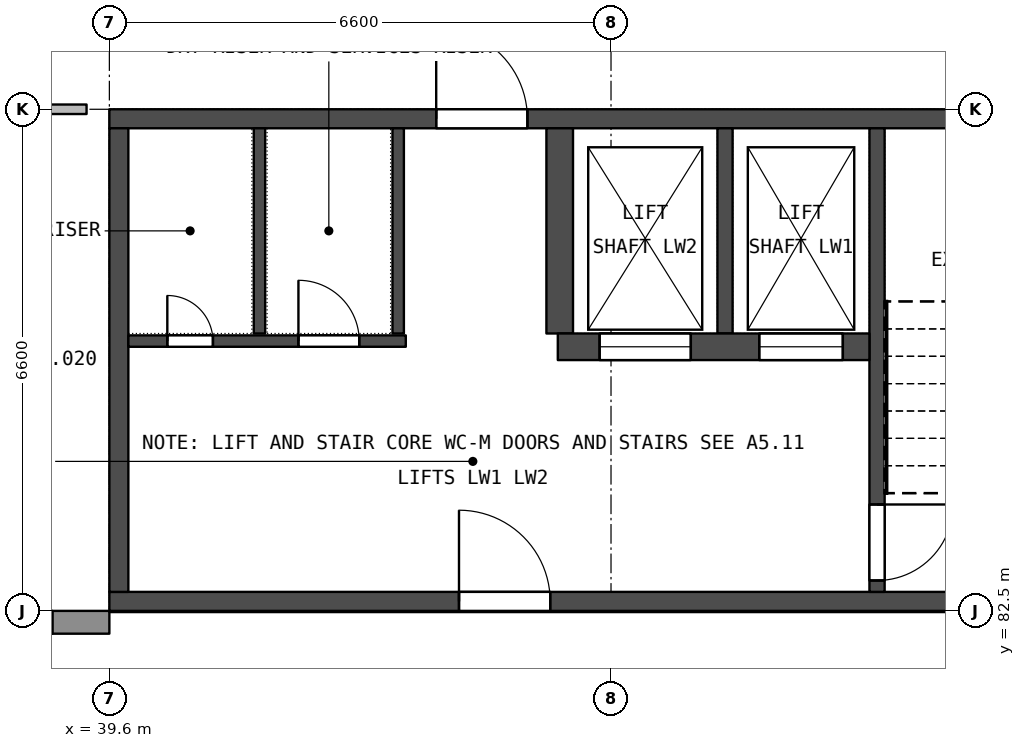
"""IFC4 building model, lengths in metres.
Left out: names, types, materials, properties, quantities, classifications, styles, units other than length and angle.
Written with IfcOpenShell. Run it as: python <this file> out.ifc"""

import sys

from ifc_helpers import new_model, si_unit, direction, frame, frame_2d, origin, place, context, subcontext, project, spatial, rectangle, extrude, element, fill, save


model = new_model("IFC4")
c1 = context("Model", 3, precision=1e-05, world=origin(), true_north=direction((0.0, 1.0)))
c2 = subcontext(c1, "Body", "Model", "MODEL_VIEW")
j1 = project(units=[si_unit("LENGTHUNIT", "METRE"), si_unit("PLANEANGLEUNIT", "RADIAN")], contexts=[c1])
p1 = place(None, origin())
s1 = spatial("IfcSite", under=j1, at=p1, CompositionType="ELEMENT")
p2 = place(p1, origin())
s2 = spatial("IfcBuilding", under=s1, at=p2, CompositionType="ELEMENT")
p3 = place(p2, origin())
s3 = spatial("IfcBuildingStorey", under=s2, at=p3, CompositionType="ELEMENT", Elevation=0.0)
p4 = place(p3, frame((52.8, 88.975, 0.0), z_axis=(0.0, 0.0, 1.0), x_axis=(-1.0, 0.0, 0.0)))
e1 = element("IfcWall", 1, at=p4, inside=s3, PredefinedType="SHEAR", context=c2, shape_type="SweptSolid", body=[
    extrude(rectangle(XDim=13.2, YDim=0.25, at=frame_2d((6.6, 0.0))), origin(), (0.0, 0.0, 1.0), 5.15),
])
p5 = place(p4, frame((7.7, 0.0, 0.0)))
e2 = element("IfcOpeningElement", 2, at=p5, cuts=e1, PredefinedType="OPENING", context=c2, shape_type="SweptSolid", body=[
    extrude(rectangle(XDim=1.2, YDim=2.1, at=frame_2d((0.6, 1.05))), frame((0.0, 0.135, 0.0), z_axis=(0.0, -1.0, 0.0), x_axis=(1.0, 0.0, 0.0)), (0.0, 0.0, 1.0), 0.27),
])
p6 = place(p3, frame((52.8, 82.625, 0.0), z_axis=(0.0, 0.0, 1.0), x_axis=(-1.0, 0.0, 0.0)))
e3 = element("IfcWall", 3, at=p6, inside=s3, PredefinedType="SHEAR", context=c2, shape_type="SweptSolid", body=[
    extrude(rectangle(XDim=13.2, YDim=0.25, at=frame_2d((6.6, 0.0))), origin(), (0.0, 0.0, 1.0), 5.15),
])
p7 = place(p6, frame((7.4, 0.0, 0.0)))
e4 = element("IfcOpeningElement", 4, at=p7, cuts=e3, PredefinedType="OPENING", context=c2, shape_type="SweptSolid", body=[
    extrude(rectangle(XDim=1.2, YDim=2.4, at=frame_2d((0.6, 1.2))), frame((0.0, 0.135, 0.0), z_axis=(0.0, -1.0, 0.0), x_axis=(1.0, 0.0, 0.0)), (0.0, 0.0, 1.0), 0.27),
])
p8 = place(p6, frame((1.075, 0.0, 0.0)))
e5 = element("IfcOpeningElement", 5, at=p8, cuts=e3, PredefinedType="OPENING", context=c2, shape_type="SweptSolid", body=[
    extrude(rectangle(XDim=1.1, YDim=2.4, at=frame_2d((0.55, 1.2))), frame((0.0, 0.135, 0.0), z_axis=(0.0, -1.0, 0.0), x_axis=(1.0, 0.0, 0.0)), (0.0, 0.0, 1.0), 0.27),
])
p9 = place(p3, frame((39.725, 88.85, 0.0), z_axis=(0.0, 0.0, 1.0), x_axis=(0.0, -1.0, 0.0)))
e6 = element("IfcWall", 6, at=p9, inside=s3, PredefinedType="SHEAR", context=c2, shape_type="SweptSolid", body=[
    extrude(rectangle(XDim=6.1, YDim=0.25, at=frame_2d((3.05, 0.0))), origin(), (0.0, 0.0, 1.0), 5.15),
])
p10 = place(p3, frame((49.7, 88.85, 0.0), z_axis=(0.0, 0.0, 1.0), x_axis=(0.0, -1.0, 0.0)))
e7 = element("IfcWall", 7, at=p10, inside=s3, PredefinedType="SHEAR", context=c2, shape_type="SweptSolid", body=[
    extrude(rectangle(XDim=6.1, YDim=0.2, at=frame_2d((3.05, 0.0))), origin(), (0.0, 0.0, 1.0), 5.15),
])
p11 = place(p10, frame((4.95, 0.0, 0.0)))
e8 = element("IfcOpeningElement", 8, at=p11, cuts=e7, PredefinedType="OPENING", context=c2, shape_type="SweptSolid", body=[
    extrude(rectangle(XDim=1.0, YDim=2.2, at=frame_2d((0.5, 1.1))), frame((0.0, 0.11, 0.0), z_axis=(0.0, -1.0, 0.0), x_axis=(1.0, 0.0, 0.0)), (0.0, 0.0, 1.0), 0.22),
])
p12 = place(p3, frame((47.7, 88.85, 0.0), z_axis=(0.0, 0.0, 1.0), x_axis=(0.0, -1.0, 0.0)))
e9 = element("IfcWall", 9, at=p12, inside=s3, PredefinedType="SHEAR", context=c2, shape_type="SweptSolid", body=[
    extrude(rectangle(XDim=2.7, YDim=0.2, at=frame_2d((1.35, 0.0))), origin(), (0.0, 0.0, 1.0), 5.15),
])
p13 = place(p3, frame((45.525, 88.85, 0.0), z_axis=(0.0, 0.0, 1.0), x_axis=(0.0, -1.0, 0.0)))
e10 = element("IfcWall", 10, at=p13, inside=s3, PredefinedType="SHEAR", context=c2, shape_type="SweptSolid", body=[
    extrude(rectangle(XDim=2.7, YDim=0.35, at=frame_2d((1.35, 0.0))), origin(), (0.0, 0.0, 1.0), 5.15),
])
p14 = place(p3, frame((49.6, 85.975, 0.0), z_axis=(0.0, 0.0, 1.0), x_axis=(-1.0, 0.0, 0.0)))
e11 = element("IfcWall", 11, at=p14, inside=s3, PredefinedType="SHEAR", context=c2, shape_type="SweptSolid", body=[
    extrude(rectangle(XDim=4.1, YDim=0.35, at=frame_2d((2.05, 0.0))), origin(), (0.0, 0.0, 1.0), 5.15),
])
p15 = place(p14, frame((0.35, 0.0, 0.0)))
e12 = element("IfcOpeningElement", 12, at=p15, cuts=e11, PredefinedType="OPENING", context=c2, shape_type="SweptSolid", body=[
    extrude(rectangle(XDim=1.1, YDim=2.2, at=frame_2d((0.55, 1.1))), frame((0.0, 0.185, 0.0), z_axis=(0.0, -1.0, 0.0), x_axis=(1.0, 0.0, 0.0)), (0.0, 0.0, 1.0), 0.37),
])
p16 = place(p14, frame((2.35, 0.0, 0.0)))
e13 = element("IfcOpeningElement", 13, at=p16, cuts=e11, PredefinedType="OPENING", context=c2, shape_type="SweptSolid", body=[
    extrude(rectangle(XDim=1.2, YDim=2.3, at=frame_2d((0.6, 1.15))), frame((0.0, 0.185, 0.0), z_axis=(0.0, -1.0, 0.0), x_axis=(1.0, 0.0, 0.0)), (0.0, 0.0, 1.0), 0.37),
])
p17 = place(p3, frame((43.4, 88.85, 0.0), z_axis=(0.0, 0.0, 1.0), x_axis=(0.0, -1.0, 0.0)))
e14 = element("IfcWall", 14, at=p17, inside=s3, PredefinedType="SHEAR", context=c2, shape_type="SweptSolid", body=[
    extrude(rectangle(XDim=2.7, YDim=0.15, at=frame_2d((1.35, 0.0))), origin(), (0.0, 0.0, 1.0), 5.15),
])
p18 = place(p3, frame((43.5, 86.05, 0.0), z_axis=(0.0, 0.0, 1.0), x_axis=(-1.0, 0.0, 0.0)))
e15 = element("IfcWall", 15, at=p18, inside=s3, PredefinedType="SHEAR", context=c2, shape_type="SweptSolid", body=[
    extrude(rectangle(XDim=3.65, YDim=0.15, at=frame_2d((1.825, 0.0))), origin(), (0.0, 0.0, 1.0), 5.15),
])
p19 = place(p18, frame((0.613, 0.0, 0.0)))
e16 = element("IfcOpeningElement", 16, at=p19, cuts=e15, PredefinedType="OPENING", context=c2, shape_type="SweptSolid", body=[
    extrude(rectangle(XDim=0.8, YDim=2.0, at=frame_2d((0.4, 1.0))), frame((0.0, 0.085, 0.0), z_axis=(0.0, -1.0, 0.0), x_axis=(1.0, 0.0, 0.0)), (0.0, 0.0, 1.0), 0.17),
])
p20 = place(p18, frame((2.538, 0.0, 0.0)))
e17 = element("IfcOpeningElement", 17, at=p20, cuts=e15, PredefinedType="OPENING", context=c2, shape_type="SweptSolid", body=[
    extrude(rectangle(XDim=0.6, YDim=2.1, at=frame_2d((0.3, 1.05))), frame((0.0, 0.085, 0.0), z_axis=(0.0, -1.0, 0.0), x_axis=(1.0, 0.0, 0.0)), (0.0, 0.0, 1.0), 0.17),
])
p21 = place(p3, frame((41.575, 88.85, 0.0), z_axis=(0.0, 0.0, 1.0), x_axis=(0.0, -1.0, 0.0)))
e18 = element("IfcWall", 18, at=p21, inside=s3, PredefinedType="SHEAR", context=c2, shape_type="SweptSolid", body=[
    extrude(rectangle(XDim=2.7, YDim=0.15, at=frame_2d((1.35, 0.0))), origin(), (0.0, 0.0, 1.0), 5.15),
])
p22 = place(p3, frame((39.6, 82.35, 0.0), z_axis=(0.0, 0.0, 1.0), x_axis=(-1.0, 0.0, 0.0)))
e19 = element("IfcWall", 19, at=p22, inside=s3, PredefinedType="STANDARD", context=c2, shape_type="SweptSolid", body=[
    extrude(rectangle(XDim=6.3, YDim=0.3, at=frame_2d((3.15, 0.0))), origin(), (0.0, 0.0, 1.0), 4.55),
])
p23 = place(p22, frame((4.05, 0.0, 0.9)))
e20 = element("IfcOpeningElement", 20, at=p23, cuts=e19, PredefinedType="OPENING", context=c2, shape_type="SweptSolid", body=[
    extrude(rectangle(XDim=1.8, YDim=1.5, at=frame_2d((0.9, 0.75))), frame((0.0, 0.16, 0.0), z_axis=(0.0, -1.0, 0.0), x_axis=(1.0, 0.0, 0.0)), (0.0, 0.0, 1.0), 0.32),
])
p24 = place(p22, frame((0.75, 0.0, 0.9)))
e21 = element("IfcOpeningElement", 21, at=p24, cuts=e19, PredefinedType="OPENING", context=c2, shape_type="SweptSolid", body=[
    extrude(rectangle(XDim=1.8, YDim=1.5, at=frame_2d((0.9, 0.75))), frame((0.0, 0.16, 0.0), z_axis=(0.0, -1.0, 0.0), x_axis=(1.0, 0.0, 0.0)), (0.0, 0.0, 1.0), 0.32),
])
p25 = place(p3, frame((39.3, 89.1, 0.0), z_axis=(0.0, 0.0, 1.0), x_axis=(-1.0, 0.0, 0.0)))
e22 = element("IfcWall", 22, at=p25, inside=s3, PredefinedType="PARTITIONING", context=c2, shape_type="SweptSolid", body=[
    extrude(rectangle(XDim=6.0, YDim=0.125, at=frame_2d((3.0, 0.0))), origin(), (0.0, 0.0, 1.0), 4.55),
])
p26 = place(p25, frame((2.55, 0.0, 0.0)))
e23 = element("IfcOpeningElement", 23, at=p26, cuts=e22, PredefinedType="OPENING", context=c2, shape_type="SweptSolid", body=[
    extrude(rectangle(XDim=0.9, YDim=2.1, at=frame_2d((0.45, 1.05))), frame((0.0, 0.073, 0.0), z_axis=(0.0, -1.0, 0.0), x_axis=(1.0, 0.0, 0.0)), (0.0, 0.0, 1.0), 0.145),
])
p27 = place(p5, origin())
e24 = element("IfcDoor", 24, at=p27, inside=s3, OperationType="SINGLE_SWING_RIGHT", PredefinedType="DOOR", context=c2, shape_type="SweptSolid", body=[
    extrude(rectangle(XDim=1.2, YDim=2.1, at=frame_2d((0.6, 1.05))), frame((0.0, 0.025, 0.0), z_axis=(0.0, -1.0, 0.0), x_axis=(1.0, 0.0, 0.0)), (0.0, 0.0, 1.0), 0.05),
])
fill(e2, e24)
p28 = place(p19, origin())
e25 = element("IfcDoor", 25, at=p28, inside=s3, OperationType="SINGLE_SWING_RIGHT", PredefinedType="DOOR", context=c2, shape_type="SweptSolid", body=[
    extrude(rectangle(XDim=0.8, YDim=2.0, at=frame_2d((0.4, 1.0))), frame((0.0, 0.025, 0.0), z_axis=(0.0, -1.0, 0.0), x_axis=(1.0, 0.0, 0.0)), (0.0, 0.0, 1.0), 0.05),
])
fill(e16, e25)
p29 = place(p20, origin())
e26 = element("IfcDoor", 26, at=p29, inside=s3, OperationType="SINGLE_SWING_RIGHT", PredefinedType="DOOR", context=c2, shape_type="SweptSolid", body=[
    extrude(rectangle(XDim=0.6, YDim=2.1, at=frame_2d((0.3, 1.05))), frame((0.0, 0.025, 0.0), z_axis=(0.0, -1.0, 0.0), x_axis=(1.0, 0.0, 0.0)), (0.0, 0.0, 1.0), 0.05),
])
fill(e17, e26)
p30 = place(p7, origin())
e27 = element("IfcDoor", 27, at=p30, inside=s3, OperationType="SINGLE_SWING_RIGHT", PredefinedType="DOOR", context=c2, shape_type="SweptSolid", body=[
    extrude(rectangle(XDim=1.2, YDim=2.4, at=frame_2d((0.6, 1.2))), frame((0.0, 0.025, 0.0), z_axis=(0.0, -1.0, 0.0), x_axis=(1.0, 0.0, 0.0)), (0.0, 0.0, 1.0), 0.05),
])
fill(e4, e27)
p31 = place(p11, origin())
e28 = element("IfcDoor", 28, at=p31, inside=s3, OperationType="SINGLE_SWING_LEFT", PredefinedType="DOOR", context=c2, shape_type="SweptSolid", body=[
    extrude(rectangle(XDim=1.0, YDim=2.2, at=frame_2d((0.5, 1.1))), frame((0.0, 0.025, 0.0), z_axis=(0.0, -1.0, 0.0), x_axis=(1.0, 0.0, 0.0)), (0.0, 0.0, 1.0), 0.05),
])
fill(e8, e28)
p32 = place(p15, origin())
e29 = element("IfcDoor", 29, at=p32, inside=s3, OperationType="DOUBLE_DOOR_SLIDING", PredefinedType="NOTDEFINED", context=c2, shape_type="SweptSolid", body=[
    extrude(rectangle(XDim=1.1, YDim=2.2, at=frame_2d((0.55, 1.1))), frame((0.0, 0.025, 0.0), z_axis=(0.0, -1.0, 0.0), x_axis=(1.0, 0.0, 0.0)), (0.0, 0.0, 1.0), 0.05),
])
fill(e12, e29)
p33 = place(p16, origin())
e30 = element("IfcDoor", 30, at=p33, inside=s3, OperationType="DOUBLE_DOOR_SLIDING", PredefinedType="NOTDEFINED", context=c2, shape_type="SweptSolid", body=[
    extrude(rectangle(XDim=1.2, YDim=2.3, at=frame_2d((0.6, 1.15))), frame((0.0, 0.025, 0.0), z_axis=(0.0, -1.0, 0.0), x_axis=(1.0, 0.0, 0.0)), (0.0, 0.0, 1.0), 0.05),
])
fill(e13, e30)
p34 = place(p24, origin())
e31 = element("IfcWindow", 31, at=p34, inside=s3, PartitioningType="SINGLE_PANEL", PredefinedType="WINDOW", context=c2, shape_type="SweptSolid", body=[
    extrude(rectangle(XDim=1.8, YDim=1.5, at=frame_2d((0.9, 0.75))), frame((0.0, 0.03, 0.0), z_axis=(0.0, -1.0, 0.0), x_axis=(1.0, 0.0, 0.0)), (0.0, 0.0, 1.0), 0.06),
])
fill(e21, e31)
save(model, sys.argv[1])
